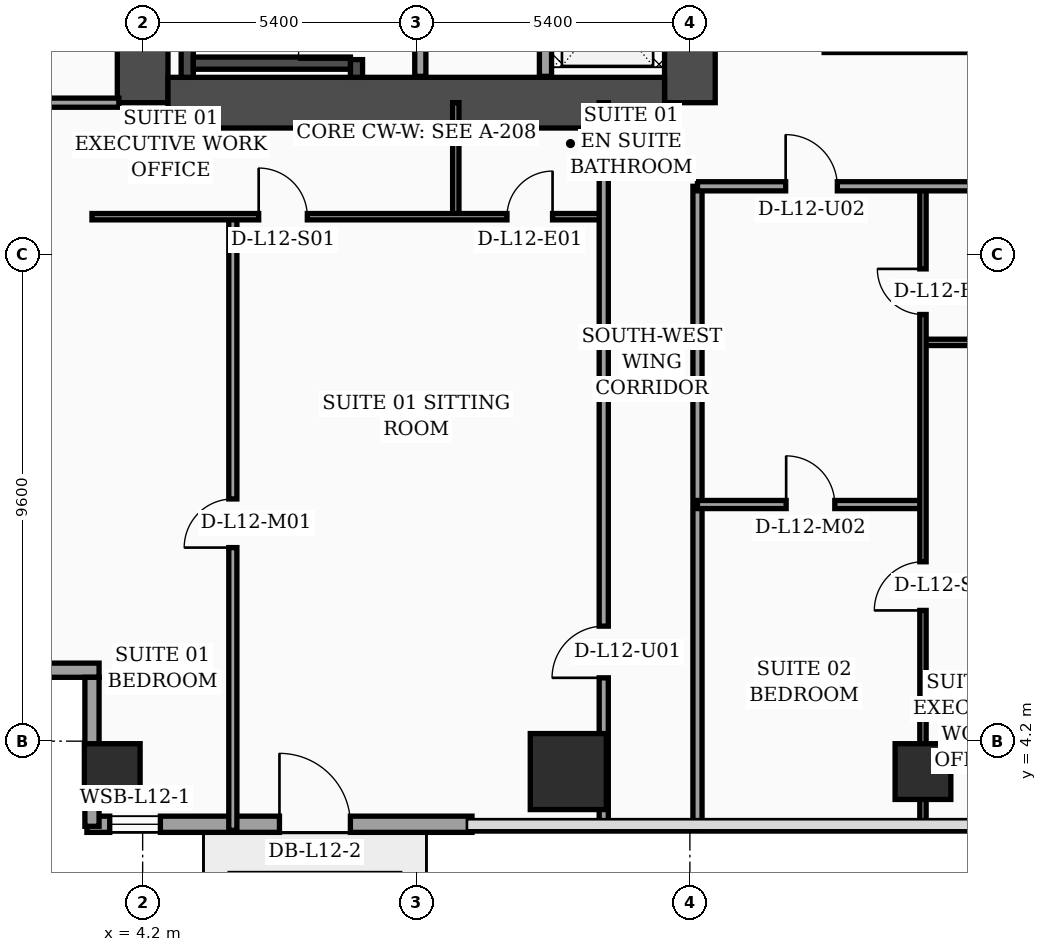
"""IFC4 building model, lengths in metres.
Left out: names, types, materials, properties, quantities, classifications, styles, units other than length and angle.
Written with IfcOpenShell. Run it as: python <this file> out.ifc"""

import sys

from ifc_helpers import new_model, si_unit, direction, frame, frame_2d, origin, origin_2d, place, context, subcontext, project, spatial, rectangle, hollow_rectangle, extrude, element, fill, save


model = new_model("IFC4")
c1 = context("Model", 3, precision=1e-05, world=origin(), true_north=direction((0.0, 1.0)))
c2 = subcontext(c1, "Body", "Model", "MODEL_VIEW")
j1 = project(units=[si_unit("LENGTHUNIT", "METRE"), si_unit("PLANEANGLEUNIT", "RADIAN")], contexts=[c1])
p1 = place(None, origin())
s1 = spatial("IfcSite", under=j1, at=p1, CompositionType="ELEMENT")
p2 = place(p1, origin())
s2 = spatial("IfcBuilding", under=s1, at=p2, CompositionType="ELEMENT")
p3 = place(p2, frame((0.0, 0.0, 54.6)))
s3 = spatial("IfcBuildingStorey", under=s2, at=p3, CompositionType="ELEMENT", Elevation=54.6)
p4 = place(p3, frame((4.2, 16.8, 0.0), z_axis=(0.0, 0.0, 1.0), x_axis=(0.0, 1.0, 0.0)))
e1 = element("IfcWall", 1, at=p4, inside=s3, PredefinedType="SHEAR", context=c2, shape_type="SweptSolid", body=[
    extrude(rectangle(XDim=21.6, YDim=1.0, at=frame_2d((10.8, 0.0))), origin(), (0.0, 0.0, 1.0), 3.56),
])
p5 = place(p3, frame((15.0, 16.8, 0.0), z_axis=(0.0, 0.0, 1.0), x_axis=(0.0, 1.0, 0.0)))
e2 = element("IfcWall", 2, at=p5, inside=s3, PredefinedType="SHEAR", context=c2, shape_type="SweptSolid", body=[
    extrude(rectangle(XDim=21.6, YDim=1.0, at=frame_2d((10.8, 0.0))), origin(), (0.0, 0.0, 1.0), 3.56),
])
p6 = place(p5, frame((8.65, 0.0, 0.0)))
e3 = element("IfcOpeningElement", 3, at=p6, cuts=e2, PredefinedType="OPENING", context=c2, shape_type="SweptSolid", body=[
    extrude(rectangle(XDim=1.1, YDim=2.2, at=frame_2d((0.55, 1.1))), frame((0.0, 0.51, 0.0), z_axis=(0.0, -1.0, 0.0), x_axis=(1.0, 0.0, 0.0)), (0.0, 0.0, 1.0), 1.02),
])
p7 = place(p5, frame((1.25, 0.0, 0.0)))
e4 = element("IfcOpeningElement", 4, at=p7, cuts=e2, PredefinedType="OPENING", context=c2, shape_type="SweptSolid", body=[
    extrude(rectangle(XDim=1.1, YDim=2.2, at=frame_2d((0.55, 1.1))), frame((0.0, 0.51, 0.0), z_axis=(0.0, -1.0, 0.0), x_axis=(1.0, 0.0, 0.0)), (0.0, 0.0, 1.0), 1.02),
])
p8 = place(p5, frame((3.8, 0.0, 0.0)))
e5 = element("IfcOpeningElement", 5, at=p8, cuts=e2, PredefinedType="OPENING", context=c2, shape_type="SweptSolid", body=[
    extrude(rectangle(XDim=1.1, YDim=2.2, at=frame_2d((0.55, 1.1))), frame((0.0, 0.51, 0.0), z_axis=(0.0, -1.0, 0.0), x_axis=(1.0, 0.0, 0.0)), (0.0, 0.0, 1.0), 1.02),
])
p9 = place(p5, frame((6.35, 0.0, 0.0)))
e6 = element("IfcOpeningElement", 6, at=p9, cuts=e2, PredefinedType="OPENING", context=c2, shape_type="SweptSolid", body=[
    extrude(rectangle(XDim=1.1, YDim=2.2, at=frame_2d((0.55, 1.1))), frame((0.0, 0.51, 0.0), z_axis=(0.0, -1.0, 0.0), x_axis=(1.0, 0.0, 0.0)), (0.0, 0.0, 1.0), 1.02),
])
p10 = place(p3, frame((4.7, 16.8, 0.0), z_axis=(0.0, 0.0, 1.0), x_axis=(1.0, 0.0, 0.0)))
e7 = element("IfcWall", 7, at=p10, inside=s3, PredefinedType="SHEAR", context=c2, shape_type="SweptSolid", body=[
    extrude(rectangle(XDim=9.8, YDim=1.0, at=frame_2d((4.9, 0.0))), origin(), (0.0, 0.0, 1.0), 3.56),
])
p11 = place(p3, frame((5.08, 17.3, 0.0), z_axis=(0.0, 0.0, 1.0), x_axis=(0.0, 1.0, 0.0)))
e8 = element("IfcWall", 8, at=p11, inside=s3, PredefinedType="SOLIDWALL", context=c2, shape_type="SweptSolid", body=[
    extrude(rectangle(XDim=9.49, YDim=0.24, at=frame_2d((4.745, 0.0))), origin(), (0.0, 0.0, 1.0), 3.56),
])
p12 = place(p3, frame((8.42, 17.3, 0.0), z_axis=(0.0, 0.0, 1.0), x_axis=(0.0, 1.0, 0.0)))
e9 = element("IfcWall", 9, at=p12, inside=s3, PredefinedType="SOLIDWALL", context=c2, shape_type="SweptSolid", body=[
    extrude(rectangle(XDim=9.49, YDim=0.24, at=frame_2d((4.745, 0.0))), origin(), (0.0, 0.0, 1.0), 3.56),
])
p13 = place(p12, frame((0.35, 0.0, 0.0)))
e10 = element("IfcOpeningElement", 10, at=p13, cuts=e9, PredefinedType="OPENING", context=c2, shape_type="SweptSolid", body=[
    extrude(rectangle(XDim=1.15, YDim=2.2, at=frame_2d((0.575, 1.1))), frame((0.0, 0.13, 0.0), z_axis=(0.0, -1.0, 0.0), x_axis=(1.0, 0.0, 0.0)), (0.0, 0.0, 1.0), 0.26),
])
p14 = place(p3, frame((5.2, 17.58, 0.0), z_axis=(0.0, 0.0, 1.0), x_axis=(1.0, 0.0, 0.0)))
e11 = element("IfcWall", 11, at=p14, inside=s3, PredefinedType="SOLIDWALL", context=c2, shape_type="SweptSolid", body=[
    extrude(rectangle(XDim=3.1, YDim=0.24, at=frame_2d((1.55, 0.0))), origin(), (0.0, 0.0, 1.0), 3.56),
])
p15 = place(p3, frame((3.6, 3.6, 0.0), z_axis=(0.0, 0.0, 1.0), x_axis=(1.0, 0.0, 0.0)))
e12 = element("IfcColumn", 12, at=p15, inside=s3, PredefinedType="COLUMN", context=c2, shape_type="SweptSolid", body=[
    extrude(hollow_rectangle(XDim=1.1, YDim=1.1, WallThickness=0.045, at=origin_2d()), origin(), (0.0, 0.0, 1.0), 3.56),
])
p16 = place(p3, frame((12.6, 3.6, 0.0), z_axis=(0.0, 0.0, 1.0), x_axis=(1.0, 0.0, 0.0)))
e13 = element("IfcColumn", 13, at=p16, inside=s3, PredefinedType="COLUMN", context=c2, shape_type="SweptSolid", body=[
    extrude(rectangle(XDim=1.5, YDim=1.5, at=origin_2d()), origin(), (0.0, 0.0, 1.0), 3.56),
])
p17 = place(p3, frame((19.6, 3.6, 0.0), z_axis=(0.0, 0.0, 1.0), x_axis=(1.0, 0.0, 0.0)))
e14 = element("IfcColumn", 14, at=p17, inside=s3, PredefinedType="COLUMN", context=c2, shape_type="SweptSolid", body=[
    extrude(hollow_rectangle(XDim=1.1, YDim=1.1, WallThickness=0.045, at=origin_2d()), origin(), (0.0, 0.0, 1.0), 3.56),
])
p18 = place(p3, frame((3.1, 2.56, 0.0), z_axis=(0.0, 0.0, 1.0), x_axis=(1.0, 0.0, 0.0)))
e15 = element("IfcWall", 15, at=p18, inside=s3, PredefinedType="SOLIDWALL", context=c2, shape_type="SweptSolid", body=[
    extrude(rectangle(XDim=7.6, YDim=0.32, at=frame_2d((3.8, 0.0))), origin(), (0.0, 0.0, 1.0), 3.56),
])
p19 = place(p18, frame((0.45, 0.0, 0.75)))
e16 = element("IfcOpeningElement", 16, at=p19, cuts=e15, PredefinedType="OPENING", context=c2, shape_type="SweptSolid", body=[
    extrude(rectangle(XDim=1.0, YDim=1.6, at=frame_2d((0.5, 0.8))), frame((0.0, 0.17, 0.0), z_axis=(0.0, -1.0, 0.0), x_axis=(1.0, 0.0, 0.0)), (0.0, 0.0, 1.0), 0.34),
])
p20 = place(p18, frame((3.8, 0.0, 0.0)))
e17 = element("IfcOpeningElement", 17, at=p20, cuts=e15, PredefinedType="OPENING", context=c2, shape_type="SweptSolid", body=[
    extrude(rectangle(XDim=1.4, YDim=2.25, at=frame_2d((0.7, 1.125))), frame((0.0, 0.17, 0.0), z_axis=(0.0, -1.0, 0.0), x_axis=(1.0, 0.0, 0.0)), (0.0, 0.0, 1.0), 0.34),
])
p21 = place(p3, frame((0.12, 5.6, 0.0), z_axis=(0.0, 0.0, 1.0), x_axis=(1.0, 0.0, 0.0)))
e18 = element("IfcWall", 18, at=p21, inside=s3, PredefinedType="SOLIDWALL", context=c2, shape_type="SweptSolid", body=[
    extrude(rectangle(XDim=3.22, YDim=0.28, at=frame_2d((1.61, 0.0))), origin(), (0.0, 0.0, 1.0), 2.84),
])
p22 = place(p3, frame((3.2, 5.46, 0.0), z_axis=(0.0, 0.0, 1.0), x_axis=(0.0, -1.0, 0.0)))
e19 = element("IfcWall", 19, at=p22, inside=s3, PredefinedType="SOLIDWALL", context=c2, shape_type="SweptSolid", body=[
    extrude(rectangle(XDim=2.94, YDim=0.28, at=frame_2d((1.47, 0.0))), origin(), (0.0, 0.0, 1.0), 2.84),
])
p23 = place(p3, frame((9.68, 17.32, 0.0), z_axis=(0.0, 0.0, 1.0), x_axis=(0.0, 1.0, 0.0)))
e20 = element("IfcWall", 20, at=p23, inside=s3, PredefinedType="SOLIDWALL", context=c2, shape_type="SweptSolid", body=[
    extrude(rectangle(XDim=7.68, YDim=0.22, at=frame_2d((3.84, 0.0))), origin(), (0.0, 0.0, 1.0), 3.56),
])
p24 = place(p3, frame((12.15, 17.32, 0.0), z_axis=(0.0, 0.0, 1.0), x_axis=(0.0, 1.0, 0.0)))
e21 = element("IfcWall", 21, at=p24, inside=s3, PredefinedType="SOLIDWALL", context=c2, shape_type="SweptSolid", body=[
    extrude(rectangle(XDim=7.65, YDim=0.24, at=frame_2d((3.825, 0.0))), origin(), (0.0, 0.0, 1.0), 3.56),
])
p25 = place(p3, frame((0.08, 16.8, 0.0), z_axis=(0.0, 0.0, 1.0), x_axis=(1.0, 0.0, 0.0)))
e22 = element("IfcWall", 22, at=p25, inside=s3, PredefinedType="PARTITIONING", context=c2, shape_type="SweptSolid", body=[
    extrude(rectangle(XDim=3.65, YDim=0.18, at=frame_2d((1.825, 0.0))), origin(), (0.0, 0.0, 1.0), 2.84),
])
p26 = place(p3, frame((10.38, 14.55, 0.0), z_axis=(0.0, 0.0, 1.0), x_axis=(0.0, 1.0, 0.0)))
e23 = element("IfcWall", 23, at=p26, inside=s3, PredefinedType="PARTITIONING", context=c2, shape_type="SweptSolid", body=[
    extrude(rectangle(XDim=2.25, YDim=0.125, at=frame_2d((1.125, 0.0))), origin(), (0.0, 0.0, 1.0), 3.56),
])
p27 = place(p3, frame((5.98, 2.44, 0.0), z_axis=(0.0, 0.0, 1.0), x_axis=(0.0, 1.0, 0.0)))
e24 = element("IfcWall", 24, at=p27, inside=s3, PredefinedType="PARTITIONING", context=c2, shape_type="SweptSolid", body=[
    extrude(rectangle(XDim=12.11, YDim=0.16, at=frame_2d((6.055, 0.0))), origin(), (0.0, 0.0, 1.0), 3.04),
])
p28 = place(p27, frame((5.58, 0.0, 0.0)))
e25 = element("IfcOpeningElement", 25, at=p28, cuts=e24, PredefinedType="OPENING", context=c2, shape_type="SweptSolid", body=[
    extrude(rectangle(XDim=0.96, YDim=2.2, at=frame_2d((0.48, 1.1))), frame((0.0, 0.09, 0.0), z_axis=(0.0, -1.0, 0.0), x_axis=(1.0, 0.0, 0.0)), (0.0, 0.0, 1.0), 0.18),
])
p29 = place(p3, frame((3.2, 14.55, 0.0), z_axis=(0.0, 0.0, 1.0), x_axis=(1.0, 0.0, 0.0)))
e26 = element("IfcWall", 26, at=p29, inside=s3, PredefinedType="PARTITIONING", context=c2, shape_type="SweptSolid", body=[
    extrude(rectangle(XDim=10.1, YDim=0.125, at=frame_2d((5.05, 0.0))), origin(), (0.0, 0.0, 1.0), 2.84),
])
p30 = place(p29, frame((3.29, 0.0, 0.0)))
e27 = element("IfcOpeningElement", 27, at=p30, cuts=e26, PredefinedType="OPENING", context=c2, shape_type="SweptSolid", body=[
    extrude(rectangle(XDim=0.96, YDim=2.2, at=frame_2d((0.48, 1.1))), frame((0.0, 0.073, 0.0), z_axis=(0.0, -1.0, 0.0), x_axis=(1.0, 0.0, 0.0)), (0.0, 0.0, 1.0), 0.145),
])
p31 = place(p29, frame((8.19, 0.0, 0.0)))
e28 = element("IfcOpeningElement", 28, at=p31, cuts=e26, PredefinedType="OPENING", context=c2, shape_type="SweptSolid", body=[
    extrude(rectangle(XDim=0.9, YDim=2.15, at=frame_2d((0.45, 1.075))), frame((0.0, 0.073, 0.0), z_axis=(0.0, -1.0, 0.0), x_axis=(1.0, 0.0, 0.0)), (0.0, 0.0, 1.0), 0.145),
])
p32 = place(p3, frame((13.3, 2.44, 0.0), z_axis=(0.0, 0.0, 1.0), x_axis=(0.0, 1.0, 0.0)))
e29 = element("IfcWall", 29, at=p32, inside=s3, PredefinedType="PARTITIONING", context=c2, shape_type="SweptSolid", body=[
    extrude(rectangle(XDim=14.36, YDim=0.18, at=frame_2d((7.18, 0.0))), origin(), (0.0, 0.0, 1.0), 3.04),
])
p33 = place(p32, frame((3.01, 0.0, 0.0)))
e30 = element("IfcOpeningElement", 30, at=p33, cuts=e29, PredefinedType="OPENING", context=c2, shape_type="SweptSolid", body=[
    extrude(rectangle(XDim=1.02, YDim=2.2, at=frame_2d((0.51, 1.1))), frame((0.0, 0.1, 0.0), z_axis=(0.0, -1.0, 0.0), x_axis=(1.0, 0.0, 0.0)), (0.0, 0.0, 1.0), 0.2),
])
p34 = place(p3, frame((15.15, 2.44, 0.0), z_axis=(0.0, 0.0, 1.0), x_axis=(0.0, 1.0, 0.0)))
e31 = element("IfcWall", 31, at=p34, inside=s3, PredefinedType="PARTITIONING", context=c2, shape_type="SweptSolid", body=[
    extrude(rectangle(XDim=12.71, YDim=0.18, at=frame_2d((6.355, 0.0))), origin(), (0.0, 0.0, 1.0), 3.04),
])
p35 = place(p3, frame((19.6, 12.07, 0.0), z_axis=(0.0, 0.0, 1.0), x_axis=(1.0, 0.0, 0.0)))
e32 = element("IfcWall", 32, at=p35, inside=s3, PredefinedType="PARTITIONING", context=c2, shape_type="SweptSolid", body=[
    extrude(rectangle(XDim=2.0, YDim=0.125, at=frame_2d((1.0, 0.0))), origin(), (0.0, 0.0, 1.0), 3.56),
])
p36 = place(p3, frame((15.15, 8.87, 0.0), z_axis=(0.0, 0.0, 1.0), x_axis=(1.0, 0.0, 0.0)))
e33 = element("IfcWall", 33, at=p36, inside=s3, PredefinedType="PARTITIONING", context=c2, shape_type="SweptSolid", body=[
    extrude(rectangle(XDim=4.45, YDim=0.16, at=frame_2d((2.225, 0.0))), origin(), (0.0, 0.0, 1.0), 3.56),
])
p37 = place(p36, frame((1.75, 0.0, 0.0)))
e34 = element("IfcOpeningElement", 34, at=p37, cuts=e33, PredefinedType="OPENING", context=c2, shape_type="SweptSolid", body=[
    extrude(rectangle(XDim=0.96, YDim=2.2, at=frame_2d((0.48, 1.1))), frame((0.0, 0.09, 0.0), z_axis=(0.0, -1.0, 0.0), x_axis=(1.0, 0.0, 0.0)), (0.0, 0.0, 1.0), 0.18),
])
p38 = place(p3, frame((19.6, 2.44, 0.0), z_axis=(0.0, 0.0, 1.0), x_axis=(0.0, 1.0, 0.0)))
e35 = element("IfcWall", 35, at=p38, inside=s3, PredefinedType="PARTITIONING", context=c2, shape_type="SweptSolid", body=[
    extrude(rectangle(XDim=12.71, YDim=0.125, at=frame_2d((6.355, 0.0))), origin(), (0.0, 0.0, 1.0), 2.34),
])
p39 = place(p38, frame((4.34, 0.0, 0.0)))
e36 = element("IfcOpeningElement", 36, at=p39, cuts=e35, PredefinedType="OPENING", context=c2, shape_type="SweptSolid", body=[
    extrude(rectangle(XDim=0.96, YDim=2.2, at=frame_2d((0.48, 1.1))), frame((0.0, 0.073, 0.0), z_axis=(0.0, -1.0, 0.0), x_axis=(1.0, 0.0, 0.0)), (0.0, 0.0, 1.0), 0.145),
])
p40 = place(p38, frame((10.18, 0.0, 0.0)))
e37 = element("IfcOpeningElement", 37, at=p40, cuts=e35, PredefinedType="OPENING", context=c2, shape_type="SweptSolid", body=[
    extrude(rectangle(XDim=0.9, YDim=2.15, at=frame_2d((0.45, 1.075))), frame((0.0, 0.073, 0.0), z_axis=(0.0, -1.0, 0.0), x_axis=(1.0, 0.0, 0.0)), (0.0, 0.0, 1.0), 0.145),
])
p41 = place(p3, frame((15.15, 15.15, 0.0), z_axis=(0.0, 0.0, 1.0), x_axis=(1.0, 0.0, 0.0)))
e38 = element("IfcWall", 38, at=p41, inside=s3, PredefinedType="PARTITIONING", context=c2, shape_type="SweptSolid", body=[
    extrude(rectangle(XDim=6.45, YDim=0.18, at=frame_2d((3.225, 0.0))), origin(), (0.0, 0.0, 1.0), 2.34),
])
p42 = place(p41, frame((1.74, 0.0, 0.0)))
e39 = element("IfcOpeningElement", 39, at=p42, cuts=e38, PredefinedType="OPENING", context=c2, shape_type="SweptSolid", body=[
    extrude(rectangle(XDim=1.02, YDim=2.2, at=frame_2d((0.51, 1.1))), frame((0.0, 0.1, 0.0), z_axis=(0.0, -1.0, 0.0), x_axis=(1.0, 0.0, 0.0)), (0.0, 0.0, 1.0), 0.2),
])
p43 = place(p3, frame((17.65, 17.88, 0.0), z_axis=(0.0, 0.0, 1.0), x_axis=(1.0, 0.0, 0.0)))
e40 = element("IfcWall", 40, at=p43, inside=s3, PredefinedType="PARTITIONING", context=c2, shape_type="SweptSolid", body=[
    extrude(rectangle(XDim=3.9, YDim=0.18, at=frame_2d((1.95, 0.0))), origin(), (0.0, 0.0, 1.0), 3.09),
])
p44 = place(p19, origin())
e41 = element("IfcWindow", 41, at=p44, inside=s3, PartitioningType="SINGLE_PANEL", PredefinedType="WINDOW", context=c2, shape_type="SweptSolid", body=[
    extrude(rectangle(XDim=1.0, YDim=1.6, at=frame_2d((0.5, 0.8))), frame((0.0, 0.03, 0.0), z_axis=(0.0, -1.0, 0.0), x_axis=(1.0, 0.0, 0.0)), (0.0, 0.0, 1.0), 0.06),
])
fill(e16, e41)
p45 = place(p20, origin())
e42 = element("IfcDoor", 42, at=p45, inside=s3, OperationType="SINGLE_SWING_LEFT", PredefinedType="DOOR", context=c2, shape_type="SweptSolid", body=[
    extrude(rectangle(XDim=1.4, YDim=2.25, at=frame_2d((0.7, 1.125))), frame((0.0, 0.025, 0.0), z_axis=(0.0, -1.0, 0.0), x_axis=(1.0, 0.0, 0.0)), (0.0, 0.0, 1.0), 0.05),
])
fill(e17, e42)
p46 = place(p28, origin())
e43 = element("IfcDoor", 43, at=p46, inside=s3, OperationType="SINGLE_SWING_LEFT", PredefinedType="DOOR", context=c2, shape_type="SweptSolid", body=[
    extrude(rectangle(XDim=0.96, YDim=2.2, at=frame_2d((0.48, 1.1))), frame((0.0, 0.025, 0.0), z_axis=(0.0, -1.0, 0.0), x_axis=(1.0, 0.0, 0.0)), (0.0, 0.0, 1.0), 0.05),
])
fill(e25, e43)
p47 = place(p30, origin())
e44 = element("IfcDoor", 44, at=p47, inside=s3, OperationType="SINGLE_SWING_LEFT", PredefinedType="DOOR", context=c2, shape_type="SweptSolid", body=[
    extrude(rectangle(XDim=0.96, YDim=2.2, at=frame_2d((0.48, 1.1))), frame((0.0, 0.025, 0.0), z_axis=(0.0, -1.0, 0.0), x_axis=(1.0, 0.0, 0.0)), (0.0, 0.0, 1.0), 0.05),
])
fill(e27, e44)
p48 = place(p31, origin())
e45 = element("IfcDoor", 45, at=p48, inside=s3, OperationType="SINGLE_SWING_RIGHT", PredefinedType="DOOR", context=c2, shape_type="SweptSolid", body=[
    extrude(rectangle(XDim=0.9, YDim=2.15, at=frame_2d((0.45, 1.075))), frame((0.0, 0.025, 0.0), z_axis=(0.0, -1.0, 0.0), x_axis=(1.0, 0.0, 0.0)), (0.0, 0.0, 1.0), 0.05),
])
fill(e28, e45)
p49 = place(p33, origin())
e46 = element("IfcDoor", 46, at=p49, inside=s3, OperationType="SINGLE_SWING_LEFT", PredefinedType="DOOR", context=c2, shape_type="SweptSolid", body=[
    extrude(rectangle(XDim=1.02, YDim=2.2, at=frame_2d((0.51, 1.1))), frame((0.0, 0.025, 0.0), z_axis=(0.0, -1.0, 0.0), x_axis=(1.0, 0.0, 0.0)), (0.0, 0.0, 1.0), 0.05),
])
fill(e30, e46)
p50 = place(p37, origin())
e47 = element("IfcDoor", 47, at=p50, inside=s3, OperationType="SINGLE_SWING_LEFT", PredefinedType="DOOR", context=c2, shape_type="SweptSolid", body=[
    extrude(rectangle(XDim=0.96, YDim=2.2, at=frame_2d((0.48, 1.1))), frame((0.0, 0.025, 0.0), z_axis=(0.0, -1.0, 0.0), x_axis=(1.0, 0.0, 0.0)), (0.0, 0.0, 1.0), 0.05),
])
fill(e34, e47)
p51 = place(p39, origin())
e48 = element("IfcDoor", 48, at=p51, inside=s3, OperationType="SINGLE_SWING_LEFT", PredefinedType="DOOR", context=c2, shape_type="SweptSolid", body=[
    extrude(rectangle(XDim=0.96, YDim=2.2, at=frame_2d((0.48, 1.1))), frame((0.0, 0.025, 0.0), z_axis=(0.0, -1.0, 0.0), x_axis=(1.0, 0.0, 0.0)), (0.0, 0.0, 1.0), 0.05),
])
fill(e36, e48)
p52 = place(p40, origin())
e49 = element("IfcDoor", 49, at=p52, inside=s3, OperationType="SINGLE_SWING_RIGHT", PredefinedType="DOOR", context=c2, shape_type="SweptSolid", body=[
    extrude(rectangle(XDim=0.9, YDim=2.15, at=frame_2d((0.45, 1.075))), frame((0.0, 0.025, 0.0), z_axis=(0.0, -1.0, 0.0), x_axis=(1.0, 0.0, 0.0)), (0.0, 0.0, 1.0), 0.05),
])
fill(e37, e49)
p53 = place(p42, origin())
e50 = element("IfcDoor", 50, at=p53, inside=s3, OperationType="SINGLE_SWING_LEFT", PredefinedType="DOOR", context=c2, shape_type="SweptSolid", body=[
    extrude(rectangle(XDim=1.02, YDim=2.2, at=frame_2d((0.51, 1.1))), frame((0.0, 0.025, 0.0), z_axis=(0.0, -1.0, 0.0), x_axis=(1.0, 0.0, 0.0)), (0.0, 0.0, 1.0), 0.05),
])
fill(e39, e50)
p54 = place(p13, origin())
e51 = element("IfcDoor", 51, at=p54, inside=s3, OperationType="SINGLE_SWING_LEFT", PredefinedType="DOOR", context=c2, shape_type="SweptSolid", body=[
    extrude(rectangle(XDim=1.15, YDim=2.2, at=frame_2d((0.575, 1.1))), frame((0.0, 0.025, 0.0), z_axis=(0.0, -1.0, 0.0), x_axis=(1.0, 0.0, 0.0)), (0.0, 0.0, 1.0), 0.05),
])
fill(e10, e51)
save(model, sys.argv[1])
